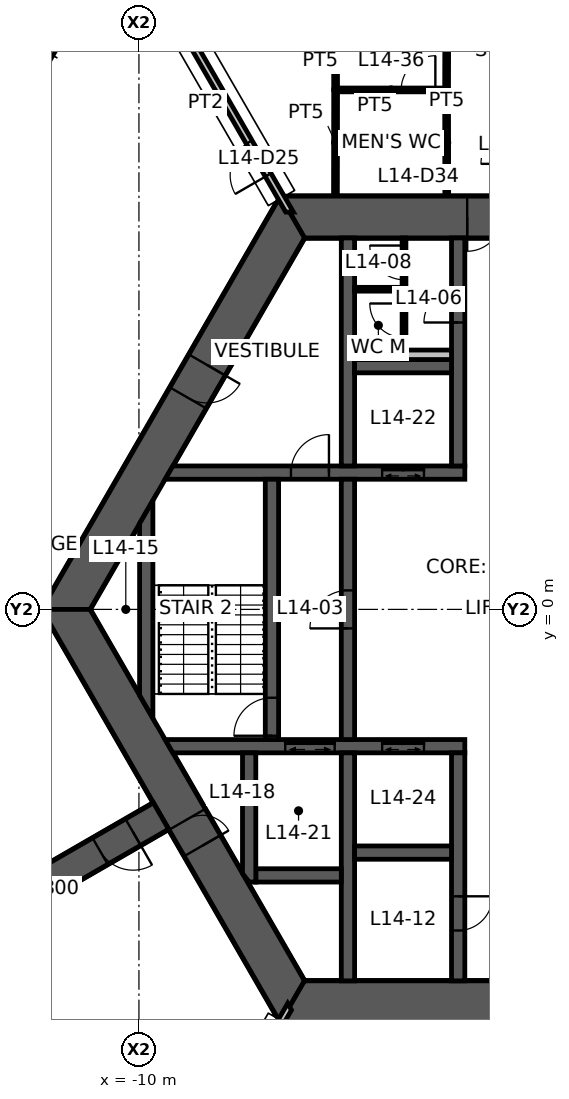
"""IFC4 building model, lengths in metres.
Left out: names, types, materials, properties, quantities, classifications, styles, units other than length and angle.
Written with IfcOpenShell. Run it as: python <this file> out.ifc"""

import sys

from ifc_helpers import new_model, si_unit, direction, frame, frame_2d, origin, place, context, subcontext, project, spatial, polyline, rectangle, outline, extrude, element, fill, save


model = new_model("IFC4")
c1 = context("Model", 3, precision=1e-05, world=origin(), true_north=direction((0.0, 1.0)))
c2 = subcontext(c1, "Body", "Model", "MODEL_VIEW")
j1 = project(units=[si_unit("LENGTHUNIT", "METRE"), si_unit("PLANEANGLEUNIT", "RADIAN")], contexts=[c1])
p1 = place(None, origin())
s1 = spatial("IfcSite", under=j1, at=p1, CompositionType="ELEMENT")
p2 = place(p1, origin())
s2 = spatial("IfcBuilding", under=s1, at=p2, CompositionType="ELEMENT")
p3 = place(p2, frame((0.0, 0.0, 57.0)))
s3 = spatial("IfcBuildingStorey", under=s2, at=p3, CompositionType="ELEMENT", Elevation=57.0)
p4 = place(p3, frame((5.961, 10.325, 0.0), z_axis=(0.0, 0.0, 1.0), x_axis=(-1.0, 0.0, 0.0)))
e1 = element("IfcWall", 1, at=p4, inside=s3, PredefinedType="SHEAR", context=c2, shape_type="SweptSolid", body=[
    extrude(outline(polyline([(-0.318, -0.55), (4.599, -0.55), (5.499, -0.55), (6.424, -0.55), (7.323, -0.55), (12.24, -0.55), (11.605, 0.55), (7.323, 0.55), (6.424, 0.55), (5.499, 0.55), (4.599, 0.55), (0.318, 0.55), (-0.318, -0.55)])), origin(), (0.0, 0.0, 1.0), 4.2),
])
p5 = place(p4, frame((6.424, 0.0, 0.0)))
e2 = element("IfcOpeningElement", 2, at=p5, cuts=e1, PredefinedType="OPENING", context=c2, shape_type="SweptSolid", body=[
    extrude(rectangle(XDim=0.9, YDim=2.1, at=frame_2d((0.45, 1.05))), frame((0.0, 0.56, 0.0), z_axis=(0.0, -1.0, 0.0), x_axis=(1.0, 0.0, 0.0)), (0.0, 0.0, 1.0), 1.12),
])
p6 = place(p4, frame((4.599, 0.0, 0.0)))
e3 = element("IfcOpeningElement", 3, at=p6, cuts=e1, PredefinedType="OPENING", context=c2, shape_type="SweptSolid", body=[
    extrude(rectangle(XDim=0.9, YDim=2.1, at=frame_2d((0.45, 1.05))), frame((0.0, 0.56, 0.0), z_axis=(0.0, -1.0, 0.0), x_axis=(1.0, 0.0, 0.0)), (0.0, 0.0, 1.0), 1.12),
])
p7 = place(p3, frame((-5.961, 10.325, 0.0), z_axis=(0.0, 0.0, 1.0), x_axis=(-0.500004296715, -0.866022923061, 0.0)))
e4 = element("IfcWall", 4, at=p7, inside=s3, PredefinedType="SHEAR", context=c2, shape_type="SweptSolid", body=[
    extrude(outline(polyline([(-0.318, -0.55), (4.494, -0.55), (5.494, -0.55), (12.24, -0.55), (11.605, 0.55), (5.494, 0.55), (4.494, 0.55), (0.318, 0.55), (-0.318, -0.55)])), origin(), (0.0, 0.0, 1.0), 4.2),
])
p8 = place(p7, frame((4.494, 0.0, 0.0)))
e5 = element("IfcOpeningElement", 5, at=p8, cuts=e4, PredefinedType="OPENING", context=c2, shape_type="SweptSolid", body=[
    extrude(rectangle(XDim=1.0, YDim=2.1, at=frame_2d((0.5, 1.05))), frame((0.0, 0.56, 0.0), z_axis=(0.0, -1.0, 0.0), x_axis=(1.0, 0.0, 0.0)), (0.0, 0.0, 1.0), 1.12),
])
p9 = place(p3, frame((-11.922, 0.0, 0.0), z_axis=(0.0, 0.0, 1.0), x_axis=(0.500004296715, -0.866022923061, 0.0)))
e6 = element("IfcWall", 6, at=p9, inside=s3, PredefinedType="SHEAR", context=c2, shape_type="SweptSolid", body=[
    extrude(outline(polyline([(-0.318, -0.55), (6.381, -0.55), (7.181, -0.55), (12.24, -0.55), (11.605, 0.55), (7.181, 0.55), (6.381, 0.55), (0.318, 0.55), (-0.318, -0.55)])), origin(), (0.0, 0.0, 1.0), 4.2),
])
p10 = place(p9, frame((6.381, 0.0, 0.0)))
e7 = element("IfcOpeningElement", 7, at=p10, cuts=e6, PredefinedType="OPENING", context=c2, shape_type="SweptSolid", body=[
    extrude(rectangle(XDim=0.8, YDim=2.1, at=frame_2d((0.4, 1.05))), frame((0.0, 0.56, 0.0), z_axis=(0.0, -1.0, 0.0), x_axis=(1.0, 0.0, 0.0)), (0.0, 0.0, 1.0), 1.12),
])
p11 = place(p3, frame((-5.961, -10.325, 0.0), z_axis=(0.0, 0.0, 1.0), x_axis=(1.0, 0.0, 0.0)))
e8 = element("IfcWall", 8, at=p11, inside=s3, PredefinedType="SHEAR", context=c2, shape_type="SweptSolid", body=[
    extrude(outline(polyline([(-0.318, -0.55), (5.461, -0.55), (6.461, -0.55), (12.24, -0.55), (11.605, 0.55), (6.461, 0.55), (5.461, 0.55), (0.318, 0.55), (-0.318, -0.55)])), origin(), (0.0, 0.0, 1.0), 4.2),
])
p12 = place(p11, frame((5.461, 0.0, 0.0)))
e9 = element("IfcOpeningElement", 9, at=p12, cuts=e8, PredefinedType="OPENING", context=c2, shape_type="SweptSolid", body=[
    extrude(rectangle(XDim=1.0, YDim=2.1, at=frame_2d((0.5, 1.05))), frame((0.0, 0.56, 0.0), z_axis=(0.0, -1.0, 0.0), x_axis=(1.0, 0.0, 0.0)), (0.0, 0.0, 1.0), 1.12),
])
p13 = place(p3, frame((-9.418, -5.438, 0.0), z_axis=(0.0, 0.0, 1.0), x_axis=(-0.866029782078, -0.499992416496, 0.0)))
e10 = element("IfcWall", 10, at=p13, inside=s3, PredefinedType="SHEAR", context=c2, shape_type="SweptSolid", body=[
    extrude(rectangle(XDim=7.646, YDim=0.8, at=frame_2d((3.823, 0.0))), origin(), (0.0, 0.0, 1.0), 4.2),
])
p14 = place(p13, frame((0.85, 0.0, 0.0)))
e11 = element("IfcOpeningElement", 11, at=p14, cuts=e10, PredefinedType="OPENING", context=c2, shape_type="SweptSolid", body=[
    extrude(rectangle(XDim=1.0, YDim=2.1, at=frame_2d((0.5, 1.05))), frame((0.0, 0.41, 0.0), z_axis=(0.0, -1.0, 0.0), x_axis=(1.0, 0.0, 0.0)), (0.0, 0.0, 1.0), 0.82),
])
p15 = place(p3, frame((-9.209, 3.6, 0.0), z_axis=(0.0, 0.0, 1.0), x_axis=(1.0, 0.0, 0.0)))
e12 = element("IfcWall", 12, at=p15, inside=s3, PredefinedType="SHEAR", context=c2, shape_type="SweptSolid", body=[
    extrude(outline(polyline([(-0.101, -0.175), (3.209, -0.175), (4.209, -0.175), (5.609, -0.175), (6.709, -0.175), (7.784, -0.175), (7.784, 0.175), (6.709, 0.175), (5.609, 0.175), (4.209, 0.175), (3.209, 0.175), (0.101, 0.175), (-0.101, -0.175)])), origin(), (0.0, 0.0, 1.0), 4.2),
])
p16 = place(p15, frame((3.209, 0.0, 0.0)))
e13 = element("IfcOpeningElement", 13, at=p16, cuts=e12, PredefinedType="OPENING", context=c2, shape_type="SweptSolid", body=[
    extrude(rectangle(XDim=1.0, YDim=2.1, at=frame_2d((0.5, 1.05))), frame((0.0, 0.185, 0.0), z_axis=(0.0, -1.0, 0.0), x_axis=(1.0, 0.0, 0.0)), (0.0, 0.0, 1.0), 0.37),
])
p17 = place(p15, frame((5.609, 0.0, 0.0)))
e14 = element("IfcOpeningElement", 14, at=p17, cuts=e12, PredefinedType="OPENING", context=c2, shape_type="SweptSolid", body=[
    extrude(rectangle(XDim=1.1, YDim=2.1, at=frame_2d((0.55, 1.05))), frame((0.0, 0.185, 0.0), z_axis=(0.0, -1.0, 0.0), x_axis=(1.0, 0.0, 0.0)), (0.0, 0.0, 1.0), 0.37),
])
p18 = place(p3, frame((-9.209, -3.6, 0.0), z_axis=(0.0, 0.0, 1.0), x_axis=(1.0, 0.0, 0.0)))
e15 = element("IfcWall", 15, at=p18, inside=s3, PredefinedType="SHEAR", context=c2, shape_type="SweptSolid", body=[
    extrude(outline(polyline([(0.101, -0.175), (3.059, -0.175), (4.359, -0.175), (5.609, -0.175), (6.709, -0.175), (7.784, -0.175), (7.784, 0.175), (6.709, 0.175), (5.609, 0.175), (4.359, 0.175), (3.059, 0.175), (-0.101, 0.175), (0.101, -0.175)])), origin(), (0.0, 0.0, 1.0), 4.2),
])
p19 = place(p18, frame((5.609, 0.0, 0.0)))
e16 = element("IfcOpeningElement", 16, at=p19, cuts=e15, PredefinedType="OPENING", context=c2, shape_type="SweptSolid", body=[
    extrude(rectangle(XDim=1.1, YDim=2.1, at=frame_2d((0.55, 1.05))), frame((0.0, 0.185, 0.0), z_axis=(0.0, -1.0, 0.0), x_axis=(1.0, 0.0, 0.0)), (0.0, 0.0, 1.0), 0.37),
])
p20 = place(p18, frame((3.059, 0.0, 0.0)))
e17 = element("IfcOpeningElement", 17, at=p20, cuts=e15, PredefinedType="OPENING", context=c2, shape_type="SweptSolid", body=[
    extrude(rectangle(XDim=1.3, YDim=2.1, at=frame_2d((0.65, 1.05))), frame((0.0, 0.185, 0.0), z_axis=(0.0, -1.0, 0.0), x_axis=(1.0, 0.0, 0.0)), (0.0, 0.0, 1.0), 0.37),
])
p21 = place(p3, frame((-1.6, 3.775, 0.0), z_axis=(0.0, 0.0, 1.0), x_axis=(0.0, 1.0, 0.0)))
e18 = element("IfcWall", 18, at=p21, inside=s3, PredefinedType="SHEAR", context=c2, shape_type="SweptSolid", body=[
    extrude(rectangle(XDim=6.0, YDim=0.35, at=frame_2d((3.0, 0.0))), origin(), (0.0, 0.0, 1.0), 4.2),
])
p22 = place(p21, frame((3.775, 0.0, 0.0)))
e19 = element("IfcOpeningElement", 19, at=p22, cuts=e18, PredefinedType="OPENING", context=c2, shape_type="SweptSolid", body=[
    extrude(rectangle(XDim=0.9, YDim=2.1, at=frame_2d((0.45, 1.05))), frame((0.0, 0.185, 0.0), z_axis=(0.0, -1.0, 0.0), x_axis=(1.0, 0.0, 0.0)), (0.0, 0.0, 1.0), 0.37),
])
p23 = place(p3, frame((-1.6, -3.775, 0.0), z_axis=(0.0, 0.0, 1.0), x_axis=(0.0, -1.0, 0.0)))
e20 = element("IfcWall", 20, at=p23, inside=s3, PredefinedType="SHEAR", context=c2, shape_type="SweptSolid", body=[
    extrude(rectangle(XDim=6.0, YDim=0.35, at=frame_2d((3.0, 0.0))), origin(), (0.0, 0.0, 1.0), 4.2),
])
p24 = place(p23, frame((3.775, 0.0, 0.0)))
e21 = element("IfcOpeningElement", 21, at=p24, cuts=e20, PredefinedType="OPENING", context=c2, shape_type="SweptSolid", body=[
    extrude(rectangle(XDim=0.9, YDim=2.1, at=frame_2d((0.45, 1.05))), frame((0.0, 0.185, 0.0), z_axis=(0.0, -1.0, 0.0), x_axis=(1.0, 0.0, 0.0)), (0.0, 0.0, 1.0), 0.37),
])
p25 = place(p3, frame((-4.5, -3.425, 0.0), z_axis=(0.0, 0.0, 1.0), x_axis=(0.0, 1.0, 0.0)))
e22 = element("IfcWall", 22, at=p25, inside=s3, PredefinedType="SHEAR", context=c2, shape_type="SweptSolid", body=[
    extrude(rectangle(XDim=6.85, YDim=0.35, at=frame_2d((3.425, 0.0))), origin(), (0.0, 0.0, 1.0), 4.2),
])
p26 = place(p25, frame((2.925, 0.0, 0.0)))
e23 = element("IfcOpeningElement", 23, at=p26, cuts=e22, PredefinedType="OPENING", context=c2, shape_type="SweptSolid", body=[
    extrude(rectangle(XDim=1.0, YDim=2.1, at=frame_2d((0.5, 1.05))), frame((0.0, 0.185, 0.0), z_axis=(0.0, -1.0, 0.0), x_axis=(1.0, 0.0, 0.0)), (0.0, 0.0, 1.0), 0.37),
])
p27 = place(p3, frame((-6.5, -3.425, 0.0), z_axis=(0.0, 0.0, 1.0), x_axis=(0.0, 1.0, 0.0)))
e24 = element("IfcWall", 24, at=p27, inside=s3, PredefinedType="SHEAR", context=c2, shape_type="SweptSolid", body=[
    extrude(rectangle(XDim=6.85, YDim=0.35, at=frame_2d((3.425, 0.0))), origin(), (0.0, 0.0, 1.0), 4.2),
])
p28 = place(p27, frame((0.1, 0.0, 0.0)))
e25 = element("IfcOpeningElement", 25, at=p28, cuts=e24, PredefinedType="OPENING", context=c2, shape_type="SweptSolid", body=[
    extrude(rectangle(XDim=1.0, YDim=2.1, at=frame_2d((0.5, 1.05))), frame((0.0, 0.185, 0.0), z_axis=(0.0, -1.0, 0.0), x_axis=(1.0, 0.0, 0.0)), (0.0, 0.0, 1.0), 0.37),
])
for number, where, z_axis, x_axis in (
    (26, (-4.5, 3.775, 0.0), (0.0, 0.0, 1.0), (0.0, 1.0, 0.0)),
    (27, (-4.5, -3.775, 0.0), (0.0, 0.0, 1.0), (0.0, -1.0, 0.0)),
):
    element("IfcWall", number, at=place(p3, frame(where, z_axis=z_axis, x_axis=x_axis)), inside=s3, PredefinedType="SHEAR", context=c2, shape_type="SweptSolid", body=[
        extrude(rectangle(XDim=6.0, YDim=0.35, at=frame_2d((3.0, 0.0))), origin(), (0.0, 0.0, 1.0), 4.2),
    ])
for number, where, z_axis, x_axis in (
    (28, (-4.325, 6.4, 0.0), (0.0, 0.0, 1.0), (1.0, 0.0, 0.0)),
    (29, (-4.325, -6.4, 0.0), (0.0, 0.0, 1.0), (1.0, 0.0, 0.0)),
):
    element("IfcWall", number, at=place(p3, frame(where, z_axis=z_axis, x_axis=x_axis)), inside=s3, PredefinedType="SHEAR", context=c2, shape_type="SweptSolid", body=[
        extrude(rectangle(XDim=2.55, YDim=0.35, at=frame_2d((1.275, 0.0))), origin(), (0.0, 0.0, 1.0), 4.2),
    ])
p29 = place(p3, frame((-6.925, -7.0, 0.0), z_axis=(0.0, 0.0, 1.0), x_axis=(1.0, 0.0, 0.0)))
e30 = element("IfcWall", 30, at=p29, inside=s3, PredefinedType="SHEAR", context=c2, shape_type="SweptSolid", body=[
    extrude(rectangle(XDim=2.25, YDim=0.35, at=frame_2d((1.125, 0.0))), origin(), (0.0, 0.0, 1.0), 4.2),
])
p30 = place(p3, frame((-7.1, -3.775, 0.0), z_axis=(0.0, 0.0, 1.0), x_axis=(0.0, -1.0, 0.0)))
e31 = element("IfcWall", 31, at=p30, inside=s3, PredefinedType="SHEAR", context=c2, shape_type="SweptSolid", body=[
    extrude(outline(polyline([(0.0, -0.175), (3.175, -0.175), (3.4, 0.0), (3.4, 0.175), (0.0, 0.175), (0.0, -0.175)])), origin(), (0.0, 0.0, 1.0), 4.2),
])
p31 = place(p3, frame((-9.808, -2.562, 0.0), z_axis=(0.0, 0.0, 1.0), x_axis=(0.0, 1.0, 0.0)))
e32 = element("IfcWall", 32, at=p31, inside=s3, PredefinedType="SHEAR", context=c2, shape_type="SweptSolid", body=[
    extrude(outline(polyline([(-0.303, -0.175), (5.428, -0.175), (4.821, 0.175), (0.303, 0.175), (-0.303, -0.175)])), origin(), (0.0, 0.0, 1.0), 4.2),
])
p32 = place(p3, frame((-4.325, 6.7, 0.0), z_axis=(0.0, 0.0, 1.0), x_axis=(1.0, 0.0, 0.0)))
e33 = element("IfcWall", 33, at=p32, inside=s3, PredefinedType="PLUMBINGWALL", context=c2, shape_type="SweptSolid", body=[
    extrude(rectangle(XDim=2.55, YDim=0.25, at=frame_2d((1.275, 0.0))), origin(), (0.0, 0.0, 1.0), 4.2),
])
p33 = place(p3, frame((-3.025, 6.575, 0.0), z_axis=(0.0, 0.0, 1.0), x_axis=(0.0, 1.0, 0.0)))
e34 = element("IfcWall", 34, at=p33, inside=s3, PredefinedType="PARTITIONING", context=c2, shape_type="SweptSolid", body=[
    extrude(rectangle(XDim=3.2, YDim=0.1, at=frame_2d((1.6, 0.0))), origin(), (0.0, 0.0, 1.0), 3.25),
])
p34 = place(p33, frame((0.575, 0.0, 0.0)))
e35 = element("IfcOpeningElement", 35, at=p34, cuts=e34, PredefinedType="OPENING", context=c2, shape_type="SweptSolid", body=[
    extrude(rectangle(XDim=0.9, YDim=2.1, at=frame_2d((0.45, 1.05))), frame((0.0, 0.06, 0.0), z_axis=(0.0, -1.0, 0.0), x_axis=(1.0, 0.0, 0.0)), (0.0, 0.0, 1.0), 0.12),
])
p35 = place(p33, frame((2.1, 0.0, 0.0)))
e36 = element("IfcOpeningElement", 36, at=p35, cuts=e34, PredefinedType="OPENING", context=c2, shape_type="SweptSolid", body=[
    extrude(rectangle(XDim=0.9, YDim=2.1, at=frame_2d((0.45, 1.05))), frame((0.0, 0.06, 0.0), z_axis=(0.0, -1.0, 0.0), x_axis=(1.0, 0.0, 0.0)), (0.0, 0.0, 1.0), 0.12),
])
p36 = place(p3, frame((-3.075, 8.425, 0.0), z_axis=(0.0, 0.0, 1.0), x_axis=(-1.0, 0.0, 0.0)))
e37 = element("IfcWall", 37, at=p36, inside=s3, PredefinedType="PARTITIONING", context=c2, shape_type="SweptSolid", body=[
    extrude(rectangle(XDim=1.25, YDim=0.1, at=frame_2d((0.625, 0.0))), origin(), (0.0, 0.0, 1.0), 3.25),
])
p37 = place(p3, frame((-6.036, 10.455, 0.0), z_axis=(0.0, 0.0, 1.0), x_axis=(-0.500007693191, 0.866020962073, 0.0)))
e38 = element("IfcWall", 38, at=p37, inside=s3, PredefinedType="PARTITIONING", context=c2, shape_type="SweptSolid", body=[
    extrude(outline(polyline([(-0.051, -0.087), (1.127, -0.087), (2.127, -0.087), (7.928, -0.087), (7.928, 0.087), (2.127, 0.087), (1.127, 0.087), (0.051, 0.087), (-0.051, -0.087)])), origin(), (0.0, 0.0, 1.0), 3.35),
])
p38 = place(p37, frame((1.127, 0.0, 0.0)))
e39 = element("IfcOpeningElement", 39, at=p38, cuts=e38, PredefinedType="OPENING", context=c2, shape_type="SweptSolid", body=[
    extrude(rectangle(XDim=1.0, YDim=2.1, at=frame_2d((0.5, 1.05))), frame((0.0, 0.098, 0.0), z_axis=(0.0, -1.0, 0.0), x_axis=(1.0, 0.0, 0.0)), (0.0, 0.0, 1.0), 0.195),
])
p39 = place(p3, frame((-6.036, -10.455, 0.0), z_axis=(0.0, 0.0, 1.0), x_axis=(-0.500007693191, -0.866020962073, 0.0)))
e40 = element("IfcWall", 40, at=p39, inside=s3, PredefinedType="PARTITIONING", context=c2, shape_type="SweptSolid", body=[
    extrude(outline(polyline([(-0.051, -0.087), (1.127, -0.087), (2.127, -0.087), (7.928, -0.087), (7.928, 0.087), (2.127, 0.087), (1.127, 0.087), (0.051, 0.087), (-0.051, -0.087)])), origin(), (0.0, 0.0, 1.0), 3.35),
])
p40 = place(p39, frame((1.127, 0.0, 0.0)))
e41 = element("IfcOpeningElement", 41, at=p40, cuts=e40, PredefinedType="OPENING", context=c2, shape_type="SweptSolid", body=[
    extrude(rectangle(XDim=1.0, YDim=2.1, at=frame_2d((0.5, 1.05))), frame((0.0, 0.098, 0.0), z_axis=(0.0, -1.0, 0.0), x_axis=(1.0, 0.0, 0.0)), (0.0, 0.0, 1.0), 0.195),
])
p41 = place(p3, frame((-4.829, 13.67, 0.0), z_axis=(0.0, 0.0, 1.0), x_axis=(1.0, 0.0, 0.0)))
e42 = element("IfcWall", 42, at=p41, inside=s3, PredefinedType="PARTITIONING", context=c2, shape_type="SweptSolid", body=[
    extrude(rectangle(XDim=2.929, YDim=0.1, at=frame_2d((1.465, 0.0))), origin(), (0.0, 0.0, 1.0), 3.25),
])
p42 = place(p41, frame((1.729, 0.0, 0.0)))
e43 = element("IfcOpeningElement", 43, at=p42, cuts=e42, PredefinedType="OPENING", context=c2, shape_type="SweptSolid", body=[
    extrude(rectangle(XDim=0.9, YDim=2.1, at=frame_2d((0.45, 1.05))), frame((0.0, 0.06, 0.0), z_axis=(0.0, -1.0, 0.0), x_axis=(1.0, 0.0, 0.0)), (0.0, 0.0, 1.0), 0.12),
])
for number, where, z_axis, x_axis in (
    (44, (-4.829, 10.895, 0.0), (0.0, 0.0, 1.0), (0.002, 1.0, 0.0)),
    (45, (-1.905, 13.675, 0.0), (0.0, 0.0, 1.0), (0.002, -1.0, 0.0)),
):
    element("IfcWall", number, at=place(p3, frame(where, z_axis=z_axis, x_axis=x_axis)), inside=s3, PredefinedType="PARTITIONING", context=c2, shape_type="SweptSolid", body=[
        extrude(rectangle(XDim=2.78, YDim=0.1, at=frame_2d((1.39, 0.0))), origin(), (0.0, 0.0, 1.0), 3.25),
    ])
for number, where, z_axis, x_axis in (
    (46, (-4.824, 13.675, 0.0), (0.0, 0.0, 1.0), (-0.003, 1.0, 0.0)),
    (47, (-1.9, 15.175, 0.0), (0.0, 0.0, 1.0), (-0.003, -1.0, 0.0)),
):
    element("IfcWall", number, at=place(p3, frame(where, z_axis=z_axis, x_axis=x_axis)), inside=s3, PredefinedType="PARTITIONING", context=c2, shape_type="SweptSolid", body=[
        extrude(rectangle(XDim=1.5, YDim=0.1, at=frame_2d((0.75, 0.0))), origin(), (0.0, 0.0, 1.0), 3.25),
    ])
p43 = place(p5, origin())
e48 = element("IfcDoor", 48, at=p43, inside=s3, OperationType="SINGLE_SWING_RIGHT", PredefinedType="DOOR", context=c2, shape_type="SweptSolid", body=[
    extrude(rectangle(XDim=0.9, YDim=2.1, at=frame_2d((0.45, 1.05))), frame((0.0, 0.025, 0.0), z_axis=(0.0, -1.0, 0.0), x_axis=(1.0, 0.0, 0.0)), (0.0, 0.0, 1.0), 0.05),
])
fill(e2, e48)
p44 = place(p10, origin())
e49 = element("IfcDoor", 49, at=p44, inside=s3, OperationType="SINGLE_SWING_RIGHT", PredefinedType="DOOR", context=c2, shape_type="SweptSolid", body=[
    extrude(rectangle(XDim=0.8, YDim=2.1, at=frame_2d((0.4, 1.05))), frame((0.0, 0.025, 0.0), z_axis=(0.0, -1.0, 0.0), x_axis=(1.0, 0.0, 0.0)), (0.0, 0.0, 1.0), 0.05),
])
fill(e7, e49)
p45 = place(p8, origin())
e50 = element("IfcDoor", 50, at=p45, inside=s3, OperationType="SINGLE_SWING_LEFT", PredefinedType="DOOR", context=c2, shape_type="SweptSolid", body=[
    extrude(rectangle(XDim=1.0, YDim=2.1, at=frame_2d((0.5, 1.05))), frame((0.0, 0.025, 0.0), z_axis=(0.0, -1.0, 0.0), x_axis=(1.0, 0.0, 0.0)), (0.0, 0.0, 1.0), 0.05),
])
fill(e5, e50)
p46 = place(p26, origin())
e51 = element("IfcDoor", 51, at=p46, inside=s3, OperationType="SINGLE_SWING_LEFT", PredefinedType="DOOR", context=c2, shape_type="SweptSolid", body=[
    extrude(rectangle(XDim=1.0, YDim=2.1, at=frame_2d((0.5, 1.05))), frame((0.0, 0.025, 0.0), z_axis=(0.0, -1.0, 0.0), x_axis=(1.0, 0.0, 0.0)), (0.0, 0.0, 1.0), 0.05),
])
fill(e23, e51)
p47 = place(p28, origin())
e52 = element("IfcDoor", 52, at=p47, inside=s3, OperationType="SINGLE_SWING_LEFT", PredefinedType="DOOR", context=c2, shape_type="SweptSolid", body=[
    extrude(rectangle(XDim=1.0, YDim=2.1, at=frame_2d((0.5, 1.05))), frame((0.0, 0.025, 0.0), z_axis=(0.0, -1.0, 0.0), x_axis=(1.0, 0.0, 0.0)), (0.0, 0.0, 1.0), 0.05),
])
fill(e25, e52)
p48 = place(p16, origin())
e53 = element("IfcDoor", 53, at=p48, inside=s3, OperationType="SINGLE_SWING_RIGHT", PredefinedType="DOOR", context=c2, shape_type="SweptSolid", body=[
    extrude(rectangle(XDim=1.0, YDim=2.1, at=frame_2d((0.5, 1.05))), frame((0.0, 0.025, 0.0), z_axis=(0.0, -1.0, 0.0), x_axis=(1.0, 0.0, 0.0)), (0.0, 0.0, 1.0), 0.05),
])
fill(e13, e53)
p49 = place(p22, origin())
e54 = element("IfcDoor", 54, at=p49, inside=s3, OperationType="SINGLE_SWING_LEFT", PredefinedType="DOOR", context=c2, shape_type="SweptSolid", body=[
    extrude(rectangle(XDim=0.9, YDim=2.1, at=frame_2d((0.45, 1.05))), frame((0.0, 0.025, 0.0), z_axis=(0.0, -1.0, 0.0), x_axis=(1.0, 0.0, 0.0)), (0.0, 0.0, 1.0), 0.05),
])
fill(e19, e54)
p50 = place(p24, origin())
e55 = element("IfcDoor", 55, at=p50, inside=s3, OperationType="SINGLE_SWING_LEFT", PredefinedType="DOOR", context=c2, shape_type="SweptSolid", body=[
    extrude(rectangle(XDim=0.9, YDim=2.1, at=frame_2d((0.45, 1.05))), frame((0.0, 0.025, 0.0), z_axis=(0.0, -1.0, 0.0), x_axis=(1.0, 0.0, 0.0)), (0.0, 0.0, 1.0), 0.05),
])
fill(e21, e55)
p51 = place(p14, origin())
e56 = element("IfcDoor", 56, at=p51, inside=s3, OperationType="SINGLE_SWING_LEFT", PredefinedType="DOOR", context=c2, shape_type="SweptSolid", body=[
    extrude(rectangle(XDim=1.0, YDim=2.1, at=frame_2d((0.5, 1.05))), frame((0.0, 0.025, 0.0), z_axis=(0.0, -1.0, 0.0), x_axis=(1.0, 0.0, 0.0)), (0.0, 0.0, 1.0), 0.05),
])
fill(e11, e56)
p52 = place(p34, origin())
e57 = element("IfcDoor", 57, at=p52, inside=s3, OperationType="SINGLE_SWING_RIGHT", PredefinedType="DOOR", context=c2, shape_type="SweptSolid", body=[
    extrude(rectangle(XDim=0.9, YDim=2.1, at=frame_2d((0.45, 1.05))), frame((0.0, 0.025, 0.0), z_axis=(0.0, -1.0, 0.0), x_axis=(1.0, 0.0, 0.0)), (0.0, 0.0, 1.0), 0.05),
])
fill(e35, e57)
p53 = place(p35, origin())
e58 = element("IfcDoor", 58, at=p53, inside=s3, OperationType="SINGLE_SWING_RIGHT", PredefinedType="DOOR", context=c2, shape_type="SweptSolid", body=[
    extrude(rectangle(XDim=0.9, YDim=2.1, at=frame_2d((0.45, 1.05))), frame((0.0, 0.025, 0.0), z_axis=(0.0, -1.0, 0.0), x_axis=(1.0, 0.0, 0.0)), (0.0, 0.0, 1.0), 0.05),
])
fill(e36, e58)
p54 = place(p38, origin())
e59 = element("IfcDoor", 59, at=p54, inside=s3, OperationType="SINGLE_SWING_LEFT", PredefinedType="DOOR", context=c2, shape_type="SweptSolid", body=[
    extrude(rectangle(XDim=1.0, YDim=2.1, at=frame_2d((0.5, 1.05))), frame((0.0, 0.025, 0.0), z_axis=(0.0, -1.0, 0.0), x_axis=(1.0, 0.0, 0.0)), (0.0, 0.0, 1.0), 0.05),
])
fill(e39, e59)
p55 = place(p42, origin())
e60 = element("IfcDoor", 60, at=p55, inside=s3, OperationType="SINGLE_SWING_RIGHT", PredefinedType="DOOR", context=c2, shape_type="SweptSolid", body=[
    extrude(rectangle(XDim=0.9, YDim=2.1, at=frame_2d((0.45, 1.05))), frame((0.0, 0.025, 0.0), z_axis=(0.0, -1.0, 0.0), x_axis=(1.0, 0.0, 0.0)), (0.0, 0.0, 1.0), 0.05),
])
fill(e43, e60)
p56 = place(p17, origin())
e61 = element("IfcDoor", 61, at=p56, inside=s3, OperationType="DOUBLE_DOOR_SLIDING", PredefinedType="DOOR", context=c2, shape_type="SweptSolid", body=[
    extrude(rectangle(XDim=1.1, YDim=2.1, at=frame_2d((0.55, 1.05))), frame((0.0, 0.025, 0.0), z_axis=(0.0, -1.0, 0.0), x_axis=(1.0, 0.0, 0.0)), (0.0, 0.0, 1.0), 0.05),
])
fill(e14, e61)
p57 = place(p19, origin())
e62 = element("IfcDoor", 62, at=p57, inside=s3, OperationType="DOUBLE_DOOR_SLIDING", PredefinedType="DOOR", context=c2, shape_type="SweptSolid", body=[
    extrude(rectangle(XDim=1.1, YDim=2.1, at=frame_2d((0.55, 1.05))), frame((0.0, 0.025, 0.0), z_axis=(0.0, -1.0, 0.0), x_axis=(1.0, 0.0, 0.0)), (0.0, 0.0, 1.0), 0.05),
])
fill(e16, e62)
p58 = place(p20, origin())
e63 = element("IfcDoor", 63, at=p58, inside=s3, OperationType="DOUBLE_DOOR_SLIDING", PredefinedType="DOOR", context=c2, shape_type="SweptSolid", body=[
    extrude(rectangle(XDim=1.3, YDim=2.1, at=frame_2d((0.65, 1.05))), frame((0.0, 0.025, 0.0), z_axis=(0.0, -1.0, 0.0), x_axis=(1.0, 0.0, 0.0)), (0.0, 0.0, 1.0), 0.05),
])
fill(e17, e63)
save(model, sys.argv[1])
